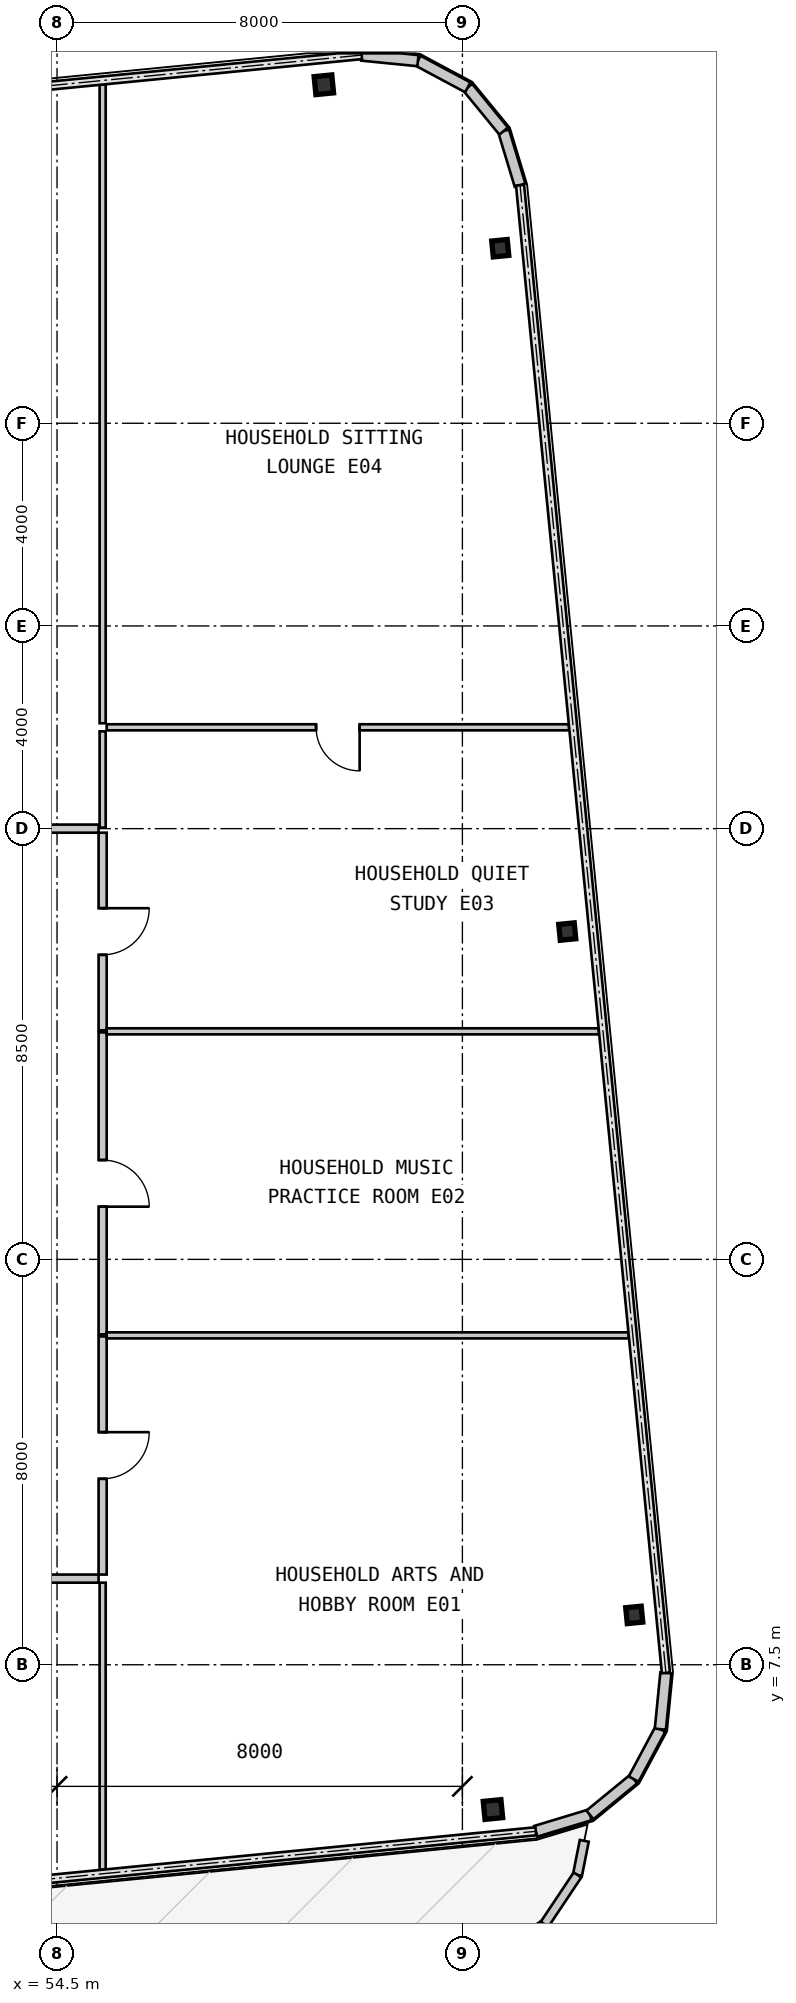
"""IFC4 building model, lengths in metres.
Left out: names, types, materials, properties, quantities, classifications, styles, units other than length and angle.
Written with IfcOpenShell. Run it as: python <this file> out.ifc"""

import sys

from ifc_helpers import new_model, si_unit, direction, frame, frame_2d, origin, origin_2d, place, context, subcontext, project, spatial, rectangle, i_section, extrude, source, transform, mapped, element, fill, save


model = new_model("IFC4")
c1 = context("Model", 3, precision=1e-05, world=origin(), true_north=direction((0.0, 1.0)))
c2 = subcontext(c1, "Body", "Model", "MODEL_VIEW")
j1 = project(units=[si_unit("LENGTHUNIT", "METRE"), si_unit("PLANEANGLEUNIT", "RADIAN")], contexts=[c1])
p1 = place(None, origin())
s1 = spatial("IfcSite", under=j1, at=p1, CompositionType="ELEMENT")
p2 = place(p1, origin())
s2 = spatial("IfcBuilding", under=s1, at=p2, CompositionType="ELEMENT")
p3 = place(p2, frame((0.0, 0.0, 65.1)))
s3 = spatial("IfcBuildingStorey", under=s2, at=p3, CompositionType="ELEMENT", Elevation=65.1)
m1 = source(origin(), c2, "Body", "SweptSolid", [
    extrude(i_section(OverallWidth=0.35, OverallDepth=0.356, WebThickness=0.018, FlangeThickness=0.028, at=origin_2d()), origin(), (0.0, 0.0, 1.0), 3.15),
])
for number, where, z_axis, x_axis in (
    (1, (63.103, 4.643, 0.0), (0.0, 0.0, 1.0), (0.995, 0.098, 0.0)),
    (2, (59.766, 38.68, 0.0), (0.0, 0.0, 1.0), (0.995, 0.098, 0.0)),
):
    element("IfcColumn", number, at=place(p3, frame(where, z_axis=z_axis, x_axis=x_axis)), inside=s3, PredefinedType="COLUMN", context=c2, shape_type="MappedRepresentation", body=[
        mapped(m1, transform((0.0, 0.0, 0.0), scale=1.0)),
    ])
m2 = source(origin(), c2, "Body", "SweptSolid", [
    extrude(i_section(OverallWidth=0.307, OverallDepth=0.315, WebThickness=0.012, FlangeThickness=0.019, at=origin_2d()), origin(), (0.0, 0.0, 1.0), 3.15),
])
for number, where, z_axis, x_axis in (
    (3, (65.892, 8.484, 0.0), (0.0, 0.0, 1.0), (0.995, 0.098, 0.0)),
    (4, (64.57, 21.969, 0.0), (0.0, 0.0, 1.0), (0.995, 0.098, 0.0)),
    (5, (63.247, 35.454, 0.0), (0.0, 0.0, 1.0), (0.995, 0.098, 0.0)),
):
    element("IfcColumn", number, at=place(p3, frame(where, z_axis=z_axis, x_axis=x_axis)), inside=s3, PredefinedType="COLUMN", context=c2, shape_type="MappedRepresentation", body=[
        mapped(m2, transform((0.0, 0.0, 0.0), scale=1.0)),
    ])
m3 = source(origin(), c2, "Body", "SweptSolid", [
    extrude(rectangle(XDim=1.116, YDim=0.22, at=frame_2d((0.558, 0.0))), origin(), (0.0, 0.0, 1.0), 2.93),
])
p4 = place(p3, frame((63.949, 4.214, 0.0), z_axis=(0.0, 0.0, 1.0), x_axis=(0.957052003726, 0.289916301997, 0.0)))
e6 = element("IfcWall", 6, at=p4, inside=s3, PredefinedType="SOLIDWALL", context=c2, shape_type="MappedRepresentation", body=[
    mapped(m3, transform((0.0, 0.0, 0.0), scale=1.0)),
])
m4 = source(origin(), c2, "Body", "SweptSolid", [
    extrude(rectangle(XDim=1.116, YDim=0.22, at=frame_2d((0.558, 0.0))), origin(), (0.0, 0.0, 1.0), 2.93),
])
p5 = place(p3, frame((65.017, 4.537, 0.0), z_axis=(0.0, 0.0, 1.0), x_axis=(0.773342870285, 0.633988016432, 0.0)))
e7 = element("IfcWall", 7, at=p5, inside=s3, PredefinedType="SOLIDWALL", context=c2, shape_type="MappedRepresentation", body=[
    mapped(m4, transform((0.0, 0.0, 0.0), scale=1.0)),
])
p6 = place(p3, frame((65.88, 5.245, 0.0), z_axis=(0.0, 0.0, 1.0), x_axis=(0.471723463201, 0.881746547635, 0.0)))
e8 = element("IfcWall", 8, at=p6, inside=s3, PredefinedType="SOLIDWALL", context=c2, shape_type="MappedRepresentation", body=[
    mapped(m3, transform((0.0, 0.0, 0.0), scale=1.0)),
])
for number, where, z_axis, x_axis in (
    (9, (66.406, 6.229, 0.0), (0.0, 0.0, 1.0), (0.098, 0.995, 0.0)),
    (10, (63.638, 36.698, 0.0), (0.0, 0.0, 1.0), (-0.29, 0.957, 0.0)),
):
    element("IfcWall", number, at=place(p3, frame(where, z_axis=z_axis, x_axis=x_axis)), inside=s3, PredefinedType="SOLIDWALL", context=c2, shape_type="MappedRepresentation", body=[
        mapped(m4, transform((0.0, 0.0, 0.0), scale=1.0)),
    ])
p7 = place(p3, frame((63.314, 37.766, 0.0), z_axis=(0.0, 0.0, 1.0), x_axis=(-0.634095287989, 0.773254916409, 0.0)))
e11 = element("IfcWall", 11, at=p7, inside=s3, PredefinedType="SOLIDWALL", context=c2, shape_type="MappedRepresentation", body=[
    mapped(m3, transform((0.0, 0.0, 0.0), scale=1.0)),
])
for number, where, z_axis, x_axis in (
    (12, (62.607, 38.629, 0.0), (0.0, 0.0, 1.0), (-0.882, 0.472, 0.0)),
    (13, (61.623, 39.156, 0.0), (0.0, 0.0, 1.0), (-0.995, 0.098, 0.0)),
):
    element("IfcWall", number, at=place(p3, frame(where, z_axis=z_axis, x_axis=x_axis)), inside=s3, PredefinedType="SOLIDWALL", context=c2, shape_type="MappedRepresentation", body=[
        mapped(m4, transform((0.0, 0.0, 0.0), scale=1.0)),
    ])
m5 = source(origin(), c2, "Body", "SweptSolid", [
    extrude(rectangle(XDim=1.171, YDim=0.18, at=frame_2d((0.585, 0.0))), origin(), (0.0, 0.0, 1.0), 1.15),
])
p8 = place(p3, frame((64.121, 2.379, 0.0), z_axis=(0.0, 0.0, 1.0), x_axis=(-0.83156866568, -0.555421960548, 0.0)))
e14 = element("IfcWall", 14, at=p8, inside=s3, PredefinedType="PARAPET", context=c2, shape_type="MappedRepresentation", body=[
    mapped(m5, transform((0.0, 0.0, 0.0), scale=1.0)),
])
m6 = source(origin(), c2, "Body", "SweptSolid", [
    extrude(rectangle(XDim=0.687, YDim=0.18, at=frame_2d((0.343, 0.0))), origin(), (0.0, 0.0, 1.0), 1.15),
])
p9 = place(p3, frame((64.906, 4.025, 0.0), z_axis=(0.0, 0.0, 1.0), x_axis=(-0.195158977943, -0.980771621392, 0.0)))
e15 = element("IfcWall", 15, at=p9, inside=s3, PredefinedType="PARAPET", context=c2, shape_type="MappedRepresentation", body=[
    mapped(m6, transform((0.0, 0.0, 0.0), scale=1.0)),
])
m7 = source(origin(), c2, "Body", "SweptSolid", [
    extrude(rectangle(XDim=1.17, YDim=0.18, at=frame_2d((0.585, 0.0))), origin(), (0.0, 0.0, 1.0), 1.15),
])
p10 = place(p3, frame((64.771, 3.352, 0.0), z_axis=(0.0, 0.0, 1.0), x_axis=(-0.555518306078, -0.831504306431, 0.0)))
e16 = element("IfcWall", 16, at=p10, inside=s3, PredefinedType="PARAPET", context=c2, shape_type="MappedRepresentation", body=[
    mapped(m7, transform((0.0, 0.0, 0.0), scale=1.0)),
])
m8 = source(origin(), c2, "Body", "SweptSolid", [
    extrude(rectangle(XDim=2.04, YDim=0.16, at=frame_2d((1.02, 0.0))), origin(), (0.0, 0.0, 1.0), 2.93),
])
p11 = place(p3, frame((55.32, 9.2, 0.0), z_axis=(0.0, 0.0, 1.0), x_axis=(-1.0, 0.0, 0.0)))
e17 = element("IfcWall", 17, at=p11, inside=s3, PredefinedType="PARTITIONING", context=c2, shape_type="MappedRepresentation", body=[
    mapped(m8, transform((0.0, 0.0, 0.0), scale=1.0)),
])
m9 = source(origin(), c2, "Body", "SweptSolid", [
    extrude(rectangle(XDim=4.7, YDim=0.16, at=frame_2d((2.35, 0.0))), origin(), (0.0, 0.0, 1.0), 2.93),
])
p12 = place(p3, frame((55.4, 13.98, 0.0), z_axis=(0.0, 0.0, 1.0), x_axis=(0.0, -1.0, 0.0)))
e18 = element("IfcWall", 18, at=p12, inside=s3, PredefinedType="PARTITIONING", context=c2, shape_type="MappedRepresentation", body=[
    mapped(m9, transform((0.0, 0.0, 0.0), scale=1.0)),
])
m10 = source(origin(), c2, "Body", "SweptSolid", [
    extrude(rectangle(XDim=0.92, YDim=2.1, at=frame_2d((0.46, 1.05))), frame((0.0, 0.09, 0.0), z_axis=(0.0, -1.0, 0.0), x_axis=(1.0, 0.0, 0.0)), (0.0, 0.0, 1.0), 0.18),
])
p13 = place(p12, frame((1.89, 0.0, 0.0)))
e19 = element("IfcOpeningElement", 19, at=p13, cuts=e18, PredefinedType="OPENING", context=c2, shape_type="MappedRepresentation", body=[
    mapped(m10, transform((0.0, 0.0, 0.0), scale=1.0)),
])
m11 = source(origin(), c2, "Body", "SweptSolid", [
    extrude(rectangle(XDim=5.959, YDim=0.16, at=frame_2d((2.98, 0.0))), origin(), (0.0, 0.0, 1.0), 2.93),
])
p14 = place(p3, frame((55.4, 19.98, 0.0), z_axis=(0.0, 0.0, 1.0), x_axis=(0.0, -1.0, 0.0)))
e20 = element("IfcWall", 20, at=p14, inside=s3, PredefinedType="PARTITIONING", context=c2, shape_type="MappedRepresentation", body=[
    mapped(m11, transform((0.0, 0.0, 0.0), scale=1.0)),
])
p15 = place(p14, frame((2.52, 0.0, 0.0)))
e21 = element("IfcOpeningElement", 21, at=p15, cuts=e20, PredefinedType="OPENING", context=c2, shape_type="MappedRepresentation", body=[
    mapped(m10, transform((0.0, 0.0, 0.0), scale=1.0)),
])
m12 = source(origin(), c2, "Body", "SweptSolid", [
    extrude(rectangle(XDim=3.9, YDim=0.16, at=frame_2d((1.95, 0.0))), origin(), (0.0, 0.0, 1.0), 2.93),
])
p16 = place(p3, frame((55.4, 23.92, 0.0), z_axis=(0.0, 0.0, 1.0), x_axis=(0.0, -1.0, 0.0)))
e22 = element("IfcWall", 22, at=p16, inside=s3, PredefinedType="PARTITIONING", context=c2, shape_type="MappedRepresentation", body=[
    mapped(m12, transform((0.0, 0.0, 0.0), scale=1.0)),
])
p17 = place(p16, frame((1.49, 0.0, 0.0)))
e23 = element("IfcOpeningElement", 23, at=p17, cuts=e22, PredefinedType="OPENING", context=c2, shape_type="MappedRepresentation", body=[
    mapped(m10, transform((0.0, 0.0, 0.0), scale=1.0)),
])
m13 = source(origin(), c2, "Body", "SweptSolid", [
    extrude(rectangle(XDim=3.016, YDim=0.16, at=frame_2d((1.508, 0.0))), origin(), (0.0, 0.0, 1.0), 2.93),
])
p18 = place(p3, frame((52.304, 24.0, 0.0), z_axis=(0.0, 0.0, 1.0), x_axis=(1.0, 0.0, 0.0)))
e24 = element("IfcWall", 24, at=p18, inside=s3, PredefinedType="PARTITIONING", context=c2, shape_type="MappedRepresentation", body=[
    mapped(m13, transform((0.0, 0.0, 0.0), scale=1.0)),
])
m14 = source(origin(), c2, "Body", "SweptSolid", [
    extrude(rectangle(XDim=5.662, YDim=0.12, at=frame_2d((2.831, 0.0))), origin(), (0.0, 0.0, 1.0), 2.93),
])
p19 = place(p3, frame((55.4, 9.12, 0.0), z_axis=(0.0, 0.0, 1.0), x_axis=(0.0, -1.0, 0.0)))
e25 = element("IfcWall", 25, at=p19, inside=s3, PredefinedType="PARTITIONING", context=c2, shape_type="MappedRepresentation", body=[
    mapped(m14, transform((0.0, 0.0, 0.0), scale=1.0)),
])
m15 = source(origin(), c2, "Body", "SweptSolid", [
    extrude(rectangle(XDim=10.301, YDim=0.12, at=frame_2d((5.15, 0.0))), origin(), (0.0, 0.0, 1.0), 2.93),
])
p20 = place(p3, frame((55.48, 14.0, 0.0), z_axis=(0.0, 0.0, 1.0), x_axis=(1.0, 0.0, 0.0)))
e26 = element("IfcWall", 26, at=p20, inside=s3, PredefinedType="PARTITIONING", context=c2, shape_type="MappedRepresentation", body=[
    mapped(m15, transform((0.0, 0.0, 0.0), scale=1.0)),
])
m16 = source(origin(), c2, "Body", "SweptSolid", [
    extrude(rectangle(XDim=9.712, YDim=0.12, at=frame_2d((4.856, 0.0))), origin(), (0.0, 0.0, 1.0), 2.93),
])
p21 = place(p3, frame((55.48, 20.0, 0.0), z_axis=(0.0, 0.0, 1.0), x_axis=(1.0, 0.0, 0.0)))
e27 = element("IfcWall", 27, at=p21, inside=s3, PredefinedType="PARTITIONING", context=c2, shape_type="MappedRepresentation", body=[
    mapped(m16, transform((0.0, 0.0, 0.0), scale=1.0)),
])
m17 = source(origin(), c2, "Body", "SweptSolid", [
    extrude(rectangle(XDim=9.124, YDim=0.12, at=frame_2d((4.562, 0.0))), origin(), (0.0, 0.0, 1.0), 2.93),
])
p22 = place(p3, frame((55.48, 26.0, 0.0), z_axis=(0.0, 0.0, 1.0), x_axis=(1.0, 0.0, 0.0)))
e28 = element("IfcWall", 28, at=p22, inside=s3, PredefinedType="PARTITIONING", context=c2, shape_type="MappedRepresentation", body=[
    mapped(m17, transform((0.0, 0.0, 0.0), scale=1.0)),
])
m18 = source(origin(), c2, "Body", "SweptSolid", [
    extrude(rectangle(XDim=0.86, YDim=2.1, at=frame_2d((0.43, 1.05))), frame((0.0, 0.07, 0.0), z_axis=(0.0, -1.0, 0.0), x_axis=(1.0, 0.0, 0.0)), (0.0, 0.0, 1.0), 0.14),
])
p23 = place(p22, frame((4.132, 0.0, 0.0)))
e29 = element("IfcOpeningElement", 29, at=p23, cuts=e28, PredefinedType="OPENING", context=c2, shape_type="MappedRepresentation", body=[
    mapped(m18, transform((0.0, 0.0, 0.0), scale=1.0)),
])
m19 = source(origin(), c2, "Body", "SweptSolid", [
    extrude(rectangle(XDim=1.9, YDim=0.12, at=frame_2d((0.95, 0.0))), origin(), (0.0, 0.0, 1.0), 2.93),
])
p24 = place(p3, frame((55.4, 24.02, 0.0), z_axis=(0.0, 0.0, 1.0), x_axis=(0.0, 1.0, 0.0)))
e30 = element("IfcWall", 30, at=p24, inside=s3, PredefinedType="PARTITIONING", context=c2, shape_type="MappedRepresentation", body=[
    mapped(m19, transform((0.0, 0.0, 0.0), scale=1.0)),
])
m20 = source(origin(), c2, "Body", "SweptSolid", [
    extrude(rectangle(XDim=12.602, YDim=0.12, at=frame_2d((6.301, 0.0))), origin(), (0.0, 0.0, 1.0), 2.93),
])
p25 = place(p3, frame((55.4, 26.08, 0.0), z_axis=(0.0, 0.0, 1.0), x_axis=(0.0, 1.0, 0.0)))
e31 = element("IfcWall", 31, at=p25, inside=s3, PredefinedType="PARTITIONING", context=c2, shape_type="MappedRepresentation", body=[
    mapped(m20, transform((0.0, 0.0, 0.0), scale=1.0)),
])
m21 = source(origin(), c2, "Body", "SweptSolid", [
    extrude(rectangle(XDim=0.92, YDim=2.1, at=frame_2d((0.46, 1.05))), frame((0.0, 0.025, 0.0), z_axis=(0.0, -1.0, 0.0), x_axis=(1.0, 0.0, 0.0)), (0.0, 0.0, 1.0), 0.05),
])
p26 = place(p13, origin())
e32 = element("IfcDoor", 32, at=p26, inside=s3, OperationType="SINGLE_SWING_LEFT", PredefinedType="DOOR", context=c2, shape_type="MappedRepresentation", body=[
    mapped(m21, transform((0.0, 0.0, 0.0), scale=1.0)),
])
fill(e19, e32)
p27 = place(p15, origin())
e33 = element("IfcDoor", 33, at=p27, inside=s3, OperationType="SINGLE_SWING_RIGHT", PredefinedType="DOOR", context=c2, shape_type="MappedRepresentation", body=[
    mapped(m21, transform((0.0, 0.0, 0.0), scale=1.0)),
])
fill(e21, e33)
p28 = place(p17, origin())
e34 = element("IfcDoor", 34, at=p28, inside=s3, OperationType="SINGLE_SWING_LEFT", PredefinedType="DOOR", context=c2, shape_type="MappedRepresentation", body=[
    mapped(m21, transform((0.0, 0.0, 0.0), scale=1.0)),
])
fill(e23, e34)
m22 = source(origin(), c2, "Body", "SweptSolid", [
    extrude(rectangle(XDim=0.86, YDim=2.1, at=frame_2d((0.43, 1.05))), frame((0.0, 0.025, 0.0), z_axis=(0.0, -1.0, 0.0), x_axis=(1.0, 0.0, 0.0)), (0.0, 0.0, 1.0), 0.05),
])
p29 = place(p23, frame((0.86, 0.0, 0.0), z_axis=(0.0, 0.0, 1.0), x_axis=(-1.0, 0.0, 0.0)))
e35 = element("IfcDoor", 35, at=p29, inside=s3, OperationType="SINGLE_SWING_LEFT", PredefinedType="DOOR", context=c2, shape_type="MappedRepresentation", body=[
    mapped(m22, transform((0.0, 0.0, 0.0), scale=1.0)),
])
fill(e29, e35)
save(model, sys.argv[1])
